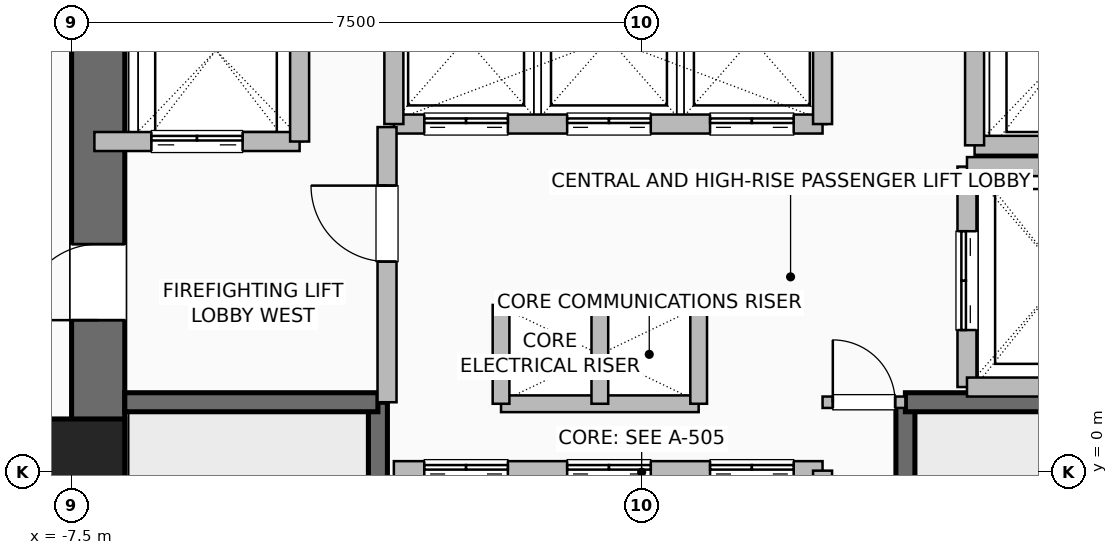
"""IFC4 building model, lengths in metres.
Left out: names, types, materials, properties, quantities, classifications, styles, units other than length and angle.
Written with IfcOpenShell. Run it as: python <this file> out.ifc"""

import sys

from ifc_helpers import new_model, si_unit, direction, frame, frame_2d, origin, origin_2d, place, context, subcontext, project, spatial, rectangle, hollow_rectangle, extrude, element, fill, save


model = new_model("IFC4")
c1 = context("Model", 3, precision=1e-05, world=origin(), true_north=direction((0.0, 1.0)))
c2 = subcontext(c1, "Body", "Model", "MODEL_VIEW")
j1 = project(units=[si_unit("LENGTHUNIT", "METRE"), si_unit("PLANEANGLEUNIT", "RADIAN")], contexts=[c1])
p1 = place(None, origin())
s1 = spatial("IfcSite", under=j1, at=p1, CompositionType="ELEMENT")
p2 = place(p1, origin())
s2 = spatial("IfcBuilding", under=s1, at=p2, CompositionType="ELEMENT")
p3 = place(p2, frame((0.0, 0.0, 10.8)))
s3 = spatial("IfcBuildingStorey", under=s2, at=p3, CompositionType="ELEMENT", Elevation=10.8)
p4 = place(p3, frame((-7.5, 0.0, 0.0), z_axis=(0.0, 0.0, 1.0), x_axis=(1.0, 0.0, 0.0)))
e1 = element("IfcColumn", 1, at=p4, inside=s3, PredefinedType="COLUMN", context=c2, shape_type="SweptSolid", body=[
    extrude(hollow_rectangle(XDim=1.4, YDim=1.4, WallThickness=0.06, at=origin_2d()), origin(), (0.0, 0.0, 1.0), 5.4),
])
p5 = place(p3, frame((-7.15, -7.5, 0.0), z_axis=(0.0, 0.0, 1.0), x_axis=(0.0, 1.0, 0.0)))
e2 = element("IfcWall", 2, at=p5, inside=s3, PredefinedType="SHEAR", context=c2, shape_type="SweptSolid", body=[
    extrude(rectangle(XDim=15.0, YDim=0.7, at=frame_2d((7.5, 0.0))), origin(), (0.0, 0.0, 1.0), 5.0),
])
p6 = place(p5, frame((9.5, 0.0, 0.0)))
e3 = element("IfcOpeningElement", 3, at=p6, cuts=e2, PredefinedType="OPENING", context=c2, shape_type="SweptSolid", body=[
    extrude(rectangle(XDim=1.0, YDim=2.08, at=frame_2d((0.5, 1.04))), frame((0.0, 0.36, 0.0), z_axis=(0.0, -1.0, 0.0), x_axis=(1.0, 0.0, 0.0)), (0.0, 0.0, 1.0), 0.72),
])
p7 = place(p3, frame((-3.47, -6.8, 0.0), z_axis=(0.0, 0.0, 1.0), x_axis=(0.0, 1.0, 0.0)))
e4 = element("IfcWall", 4, at=p7, inside=s3, PredefinedType="SHEAR", context=c2, shape_type="SweptSolid", body=[
    extrude(rectangle(XDim=7.72, YDim=0.25, at=frame_2d((3.86, 0.0))), origin(), (0.0, 0.0, 1.0), 5.0),
])
p8 = place(p3, frame((-6.8, 0.92, 0.0), z_axis=(0.0, 0.0, 1.0), x_axis=(1.0, 0.0, 0.0)))
e5 = element("IfcWall", 5, at=p8, inside=s3, PredefinedType="SHEAR", context=c2, shape_type="SweptSolid", body=[
    extrude(rectangle(XDim=3.33, YDim=0.25, at=frame_2d((1.665, 0.0))), origin(), (0.0, 0.0, 1.0), 5.0),
])
p9 = place(p3, frame((3.47, -6.8, 0.0), z_axis=(0.0, 0.0, 1.0), x_axis=(0.0, 1.0, 0.0)))
e6 = element("IfcWall", 6, at=p9, inside=s3, PredefinedType="SHEAR", context=c2, shape_type="SweptSolid", body=[
    extrude(rectangle(XDim=7.72, YDim=0.25, at=frame_2d((3.86, 0.0))), origin(), (0.0, 0.0, 1.0), 5.0),
])
p10 = place(p3, frame((3.47, 0.92, 0.0), z_axis=(0.0, 0.0, 1.0), x_axis=(1.0, 0.0, 0.0)))
e7 = element("IfcWall", 7, at=p10, inside=s3, PredefinedType="SHEAR", context=c2, shape_type="SweptSolid", body=[
    extrude(rectangle(XDim=3.33, YDim=0.25, at=frame_2d((1.665, 0.0))), origin(), (0.0, 0.0, 1.0), 5.0),
])
for number, where, z_axis, x_axis in (
    (8, (-1.85, 2.2, 0.0), (0.0, 0.0, 1.0), (1.0, 0.0, 0.0)),
    (9, (-1.85, 0.9, 0.0), (0.0, 0.0, 1.0), (1.0, 0.0, 0.0)),
):
    element("IfcWall", number, at=place(p3, frame(where, z_axis=z_axis, x_axis=x_axis)), inside=s3, PredefinedType="PARTITIONING", context=c2, shape_type="SweptSolid", body=[
        extrude(rectangle(XDim=2.6, YDim=0.22, at=frame_2d((1.3, 0.0))), origin(), (0.0, 0.0, 1.0), 5.0),
    ])
for number, where, z_axis, x_axis in (
    (10, (-0.55, 0.9, 0.0), (0.0, 0.0, 1.0), (0.0, 1.0, 0.0)),
    (11, (0.75, 0.9, 0.0), (0.0, 0.0, 1.0), (0.0, 1.0, 0.0)),
    (12, (-1.85, 0.9, 0.0), (0.0, 0.0, 1.0), (0.0, 1.0, 0.0)),
):
    element("IfcWall", number, at=place(p3, frame(where, z_axis=z_axis, x_axis=x_axis)), inside=s3, PredefinedType="PARTITIONING", context=c2, shape_type="SweptSolid", body=[
        extrude(rectangle(XDim=1.3, YDim=0.22, at=frame_2d((0.65, 0.0))), origin(), (0.0, 0.0, 1.0), 5.0),
    ])
p11 = place(p3, frame((-3.26, 0.02, 0.0), z_axis=(0.0, 0.0, 1.0), x_axis=(1.0, 0.0, 0.0)))
e13 = element("IfcWall", 13, at=p11, inside=s3, PredefinedType="SHEAR", context=c2, shape_type="SweptSolid", body=[
    extrude(rectangle(XDim=5.64, YDim=0.25, at=frame_2d((2.82, 0.0))), origin(), (0.0, 0.0, 1.0), 5.0),
])
p12 = place(p11, frame((0.4, 0.0, 0.0)))
e14 = element("IfcOpeningElement", 14, at=p12, cuts=e13, PredefinedType="OPENING", context=c2, shape_type="SweptSolid", body=[
    extrude(rectangle(XDim=1.1, YDim=2.2, at=frame_2d((0.55, 1.1))), frame((0.0, 0.135, 0.0), z_axis=(0.0, -1.0, 0.0), x_axis=(1.0, 0.0, 0.0)), (0.0, 0.0, 1.0), 0.27),
])
p13 = place(p11, frame((2.28, 0.0, 0.0)))
e15 = element("IfcOpeningElement", 15, at=p13, cuts=e13, PredefinedType="OPENING", context=c2, shape_type="SweptSolid", body=[
    extrude(rectangle(XDim=1.1, YDim=2.2, at=frame_2d((0.55, 1.1))), frame((0.0, 0.135, 0.0), z_axis=(0.0, -1.0, 0.0), x_axis=(1.0, 0.0, 0.0)), (0.0, 0.0, 1.0), 0.27),
])
p14 = place(p11, frame((4.16, 0.0, 0.0)))
e16 = element("IfcOpeningElement", 16, at=p14, cuts=e13, PredefinedType="OPENING", context=c2, shape_type="SweptSolid", body=[
    extrude(rectangle(XDim=1.1, YDim=2.2, at=frame_2d((0.55, 1.1))), frame((0.0, 0.135, 0.0), z_axis=(0.0, -1.0, 0.0), x_axis=(1.0, 0.0, 0.0)), (0.0, 0.0, 1.0), 0.27),
])
p15 = place(p3, frame((2.38, -2.42, 0.0), z_axis=(0.0, 0.0, 1.0), x_axis=(0.0, 1.0, 0.0)))
e17 = element("IfcWall", 17, at=p15, inside=s3, PredefinedType="SHEAR", context=c2, shape_type="SweptSolid", body=[
    extrude(rectangle(XDim=2.44, YDim=0.25, at=frame_2d((1.22, 0.0))), origin(), (0.0, 0.0, 1.0), 5.0),
])
p16 = place(p3, frame((-3.26, 4.58, 0.0), z_axis=(0.0, 0.0, 1.0), x_axis=(1.0, 0.0, 0.0)))
e18 = element("IfcWall", 18, at=p16, inside=s3, PredefinedType="SHEAR", context=c2, shape_type="SweptSolid", body=[
    extrude(rectangle(XDim=5.64, YDim=0.25, at=frame_2d((2.82, 0.0))), origin(), (0.0, 0.0, 1.0), 5.0),
])
p17 = place(p16, frame((0.4, 0.0, 0.0)))
e19 = element("IfcOpeningElement", 19, at=p17, cuts=e18, PredefinedType="OPENING", context=c2, shape_type="SweptSolid", body=[
    extrude(rectangle(XDim=1.1, YDim=2.2, at=frame_2d((0.55, 1.1))), frame((0.0, 0.135, 0.0), z_axis=(0.0, -1.0, 0.0), x_axis=(1.0, 0.0, 0.0)), (0.0, 0.0, 1.0), 0.27),
])
p18 = place(p16, frame((2.28, 0.0, 0.0)))
e20 = element("IfcOpeningElement", 20, at=p18, cuts=e18, PredefinedType="OPENING", context=c2, shape_type="SweptSolid", body=[
    extrude(rectangle(XDim=1.1, YDim=2.2, at=frame_2d((0.55, 1.1))), frame((0.0, 0.135, 0.0), z_axis=(0.0, -1.0, 0.0), x_axis=(1.0, 0.0, 0.0)), (0.0, 0.0, 1.0), 0.27),
])
p19 = place(p16, frame((4.16, 0.0, 0.0)))
e21 = element("IfcOpeningElement", 21, at=p19, cuts=e18, PredefinedType="OPENING", context=c2, shape_type="SweptSolid", body=[
    extrude(rectangle(XDim=1.1, YDim=2.2, at=frame_2d((0.55, 1.1))), frame((0.0, 0.135, 0.0), z_axis=(0.0, -1.0, 0.0), x_axis=(1.0, 0.0, 0.0)), (0.0, 0.0, 1.0), 0.27),
])
for number, where, z_axis, x_axis in (
    (22, (-3.26, 4.58, 0.0), (0.0, 0.0, 1.0), (0.0, 1.0, 0.0)),
    (23, (2.38, 4.58, 0.0), (0.0, 0.0, 1.0), (0.0, 1.0, 0.0)),
):
    element("IfcWall", number, at=place(p3, frame(where, z_axis=z_axis, x_axis=x_axis)), inside=s3, PredefinedType="SHEAR", context=c2, shape_type="SweptSolid", body=[
        extrude(rectangle(XDim=2.22, YDim=0.25, at=frame_2d((1.11, 0.0))), origin(), (0.0, 0.0, 1.0), 5.0),
    ])
p20 = place(p3, frame((-7.2, 4.35, 0.0), z_axis=(0.0, 0.0, 1.0), x_axis=(1.0, 0.0, 0.0)))
e24 = element("IfcWall", 24, at=p20, inside=s3, PredefinedType="SHEAR", context=c2, shape_type="SweptSolid", body=[
    extrude(rectangle(XDim=2.7, YDim=0.25, at=frame_2d((1.35, 0.0))), origin(), (0.0, 0.0, 1.0), 5.0),
])
p21 = place(p20, frame((0.75, 0.0, 0.0)))
e25 = element("IfcOpeningElement", 25, at=p21, cuts=e24, PredefinedType="OPENING", context=c2, shape_type="SweptSolid", body=[
    extrude(rectangle(XDim=1.2, YDim=2.2, at=frame_2d((0.6, 1.1))), frame((0.0, 0.135, 0.0), z_axis=(0.0, -1.0, 0.0), x_axis=(1.0, 0.0, 0.0)), (0.0, 0.0, 1.0), 0.27),
])
p22 = place(p3, frame((-4.5, 4.35, 0.0), z_axis=(0.0, 0.0, 1.0), x_axis=(0.0, 1.0, 0.0)))
e26 = element("IfcWall", 26, at=p22, inside=s3, PredefinedType="SHEAR", context=c2, shape_type="SweptSolid", body=[
    extrude(rectangle(XDim=2.85, YDim=0.25, at=frame_2d((1.425, 0.0))), origin(), (0.0, 0.0, 1.0), 5.0),
])
p23 = place(p3, frame((4.38, 4.3, 0.0), z_axis=(0.0, 0.0, 1.0), x_axis=(1.0, 0.0, 0.0)))
e27 = element("IfcWall", 27, at=p23, inside=s3, PredefinedType="SHEAR", context=c2, shape_type="SweptSolid", body=[
    extrude(rectangle(XDim=2.42, YDim=0.25, at=frame_2d((1.21, 0.0))), origin(), (0.0, 0.0, 1.0), 5.0),
])
p24 = place(p3, frame((4.38, 4.3, 0.0), z_axis=(0.0, 0.0, 1.0), x_axis=(0.0, 1.0, 0.0)))
e28 = element("IfcWall", 28, at=p24, inside=s3, PredefinedType="SHEAR", context=c2, shape_type="SweptSolid", body=[
    extrude(rectangle(XDim=2.5, YDim=0.25, at=frame_2d((1.25, 0.0))), origin(), (0.0, 0.0, 1.0), 5.0),
])
p25 = place(p3, frame((4.28, 1.12, 0.0), z_axis=(0.0, 0.0, 1.0), x_axis=(0.0, 1.0, 0.0)))
e29 = element("IfcWall", 29, at=p25, inside=s3, PredefinedType="SHEAR", context=c2, shape_type="SweptSolid", body=[
    extrude(rectangle(XDim=2.9, YDim=0.25, at=frame_2d((1.45, 0.0))), origin(), (0.0, 0.0, 1.0), 5.0),
])
p26 = place(p25, frame((0.75, 0.0, 0.0)))
e30 = element("IfcOpeningElement", 30, at=p26, cuts=e29, PredefinedType="OPENING", context=c2, shape_type="SweptSolid", body=[
    extrude(rectangle(XDim=1.3, YDim=2.3, at=frame_2d((0.65, 1.15))), frame((0.0, 0.135, 0.0), z_axis=(0.0, -1.0, 0.0), x_axis=(1.0, 0.0, 0.0)), (0.0, 0.0, 1.0), 0.27),
])
for number, where, z_axis, x_axis in (
    (31, (4.28, 1.12, 0.0), (0.0, 0.0, 1.0), (1.0, 0.0, 0.0)),
    (32, (4.28, 4.02, 0.0), (0.0, 0.0, 1.0), (1.0, 0.0, 0.0)),
):
    element("IfcWall", number, at=place(p3, frame(where, z_axis=z_axis, x_axis=x_axis)), inside=s3, PredefinedType="SHEAR", context=c2, shape_type="SweptSolid", body=[
        extrude(rectangle(XDim=2.52, YDim=0.25, at=frame_2d((1.26, 0.0))), origin(), (0.0, 0.0, 1.0), 5.0),
    ])
p27 = place(p3, frame((-3.35, 0.92, 0.0), z_axis=(0.0, 0.0, 1.0), x_axis=(0.0, 1.0, 0.0)))
e33 = element("IfcWall", 33, at=p27, inside=s3, PredefinedType="SHEAR", context=c2, shape_type="SweptSolid", body=[
    extrude(rectangle(XDim=3.62, YDim=0.25, at=frame_2d((1.81, 0.0))), origin(), (0.0, 0.0, 1.0), 5.0),
])
p28 = place(p27, frame((1.85, 0.0, 0.0)))
e34 = element("IfcOpeningElement", 34, at=p28, cuts=e33, PredefinedType="OPENING", context=c2, shape_type="SweptSolid", body=[
    extrude(rectangle(XDim=1.0, YDim=2.08, at=frame_2d((0.5, 1.04))), frame((0.0, 0.135, 0.0), z_axis=(0.0, -1.0, 0.0), x_axis=(1.0, 0.0, 0.0)), (0.0, 0.0, 1.0), 0.27),
])
p29 = place(p3, frame((2.38, 0.92, 0.0), z_axis=(0.0, 0.0, 1.0), x_axis=(1.0, 0.0, 0.0)))
e35 = element("IfcWall", 35, at=p29, inside=s3, PredefinedType="PARTITIONING", context=c2, shape_type="SweptSolid", body=[
    extrude(rectangle(XDim=1.09, YDim=0.15, at=frame_2d((0.545, 0.0))), origin(), (0.0, 0.0, 1.0), 5.0),
])
p30 = place(p29, frame((0.135, 0.0, 0.0)))
e36 = element("IfcOpeningElement", 36, at=p30, cuts=e35, PredefinedType="OPENING", context=c2, shape_type="SweptSolid", body=[
    extrude(rectangle(XDim=0.82, YDim=2.05, at=frame_2d((0.41, 1.025))), frame((0.0, 0.085, 0.0), z_axis=(0.0, -1.0, 0.0), x_axis=(1.0, 0.0, 0.0)), (0.0, 0.0, 1.0), 0.17),
])
p31 = place(p6, origin())
e37 = element("IfcDoor", 37, at=p31, inside=s3, OperationType="SINGLE_SWING_LEFT", PredefinedType="DOOR", context=c2, shape_type="SweptSolid", body=[
    extrude(rectangle(XDim=1.0, YDim=2.08, at=frame_2d((0.5, 1.04))), frame((0.0, 0.025, 0.0), z_axis=(0.0, -1.0, 0.0), x_axis=(1.0, 0.0, 0.0)), (0.0, 0.0, 1.0), 0.05),
])
fill(e3, e37)
p32 = place(p12, origin())
e38 = element("IfcDoor", 38, at=p32, inside=s3, OperationType="DOUBLE_DOOR_SLIDING", PredefinedType="DOOR", context=c2, shape_type="SweptSolid", body=[
    extrude(rectangle(XDim=1.1, YDim=2.2, at=frame_2d((0.55, 1.1))), frame((0.0, 0.025, 0.0), z_axis=(0.0, -1.0, 0.0), x_axis=(1.0, 0.0, 0.0)), (0.0, 0.0, 1.0), 0.05),
])
fill(e14, e38)
p33 = place(p13, origin())
e39 = element("IfcDoor", 39, at=p33, inside=s3, OperationType="DOUBLE_DOOR_SLIDING", PredefinedType="DOOR", context=c2, shape_type="SweptSolid", body=[
    extrude(rectangle(XDim=1.1, YDim=2.2, at=frame_2d((0.55, 1.1))), frame((0.0, 0.025, 0.0), z_axis=(0.0, -1.0, 0.0), x_axis=(1.0, 0.0, 0.0)), (0.0, 0.0, 1.0), 0.05),
])
fill(e15, e39)
p34 = place(p14, origin())
e40 = element("IfcDoor", 40, at=p34, inside=s3, OperationType="DOUBLE_DOOR_SLIDING", PredefinedType="DOOR", context=c2, shape_type="SweptSolid", body=[
    extrude(rectangle(XDim=1.1, YDim=2.2, at=frame_2d((0.55, 1.1))), frame((0.0, 0.025, 0.0), z_axis=(0.0, -1.0, 0.0), x_axis=(1.0, 0.0, 0.0)), (0.0, 0.0, 1.0), 0.05),
])
fill(e16, e40)
p35 = place(p17, origin())
e41 = element("IfcDoor", 41, at=p35, inside=s3, OperationType="DOUBLE_DOOR_SLIDING", PredefinedType="DOOR", context=c2, shape_type="SweptSolid", body=[
    extrude(rectangle(XDim=1.1, YDim=2.2, at=frame_2d((0.55, 1.1))), frame((0.0, 0.025, 0.0), z_axis=(0.0, -1.0, 0.0), x_axis=(1.0, 0.0, 0.0)), (0.0, 0.0, 1.0), 0.05),
])
fill(e19, e41)
p36 = place(p18, origin())
e42 = element("IfcDoor", 42, at=p36, inside=s3, OperationType="DOUBLE_DOOR_SLIDING", PredefinedType="DOOR", context=c2, shape_type="SweptSolid", body=[
    extrude(rectangle(XDim=1.1, YDim=2.2, at=frame_2d((0.55, 1.1))), frame((0.0, 0.025, 0.0), z_axis=(0.0, -1.0, 0.0), x_axis=(1.0, 0.0, 0.0)), (0.0, 0.0, 1.0), 0.05),
])
fill(e20, e42)
p37 = place(p19, origin())
e43 = element("IfcDoor", 43, at=p37, inside=s3, OperationType="DOUBLE_DOOR_SLIDING", PredefinedType="DOOR", context=c2, shape_type="SweptSolid", body=[
    extrude(rectangle(XDim=1.1, YDim=2.2, at=frame_2d((0.55, 1.1))), frame((0.0, 0.025, 0.0), z_axis=(0.0, -1.0, 0.0), x_axis=(1.0, 0.0, 0.0)), (0.0, 0.0, 1.0), 0.05),
])
fill(e21, e43)
p38 = place(p21, origin())
e44 = element("IfcDoor", 44, at=p38, inside=s3, OperationType="DOUBLE_DOOR_SLIDING", PredefinedType="DOOR", context=c2, shape_type="SweptSolid", body=[
    extrude(rectangle(XDim=1.2, YDim=2.2, at=frame_2d((0.6, 1.1))), frame((0.0, 0.025, 0.0), z_axis=(0.0, -1.0, 0.0), x_axis=(1.0, 0.0, 0.0)), (0.0, 0.0, 1.0), 0.05),
])
fill(e25, e44)
p39 = place(p26, origin())
e45 = element("IfcDoor", 45, at=p39, inside=s3, OperationType="DOUBLE_DOOR_SLIDING", PredefinedType="DOOR", context=c2, shape_type="SweptSolid", body=[
    extrude(rectangle(XDim=1.3, YDim=2.3, at=frame_2d((0.65, 1.15))), frame((0.0, 0.025, 0.0), z_axis=(0.0, -1.0, 0.0), x_axis=(1.0, 0.0, 0.0)), (0.0, 0.0, 1.0), 0.05),
])
fill(e30, e45)
p40 = place(p28, origin())
e46 = element("IfcDoor", 46, at=p40, inside=s3, OperationType="SINGLE_SWING_RIGHT", PredefinedType="DOOR", context=c2, shape_type="SweptSolid", body=[
    extrude(rectangle(XDim=1.0, YDim=2.08, at=frame_2d((0.5, 1.04))), frame((0.0, 0.025, 0.0), z_axis=(0.0, -1.0, 0.0), x_axis=(1.0, 0.0, 0.0)), (0.0, 0.0, 1.0), 0.05),
])
fill(e34, e46)
p41 = place(p30, origin())
e47 = element("IfcDoor", 47, at=p41, inside=s3, OperationType="SINGLE_SWING_LEFT", PredefinedType="DOOR", context=c2, shape_type="SweptSolid", body=[
    extrude(rectangle(XDim=0.82, YDim=2.05, at=frame_2d((0.41, 1.025))), frame((0.0, 0.025, 0.0), z_axis=(0.0, -1.0, 0.0), x_axis=(1.0, 0.0, 0.0)), (0.0, 0.0, 1.0), 0.05),
])
fill(e36, e47)
save(model, sys.argv[1])
